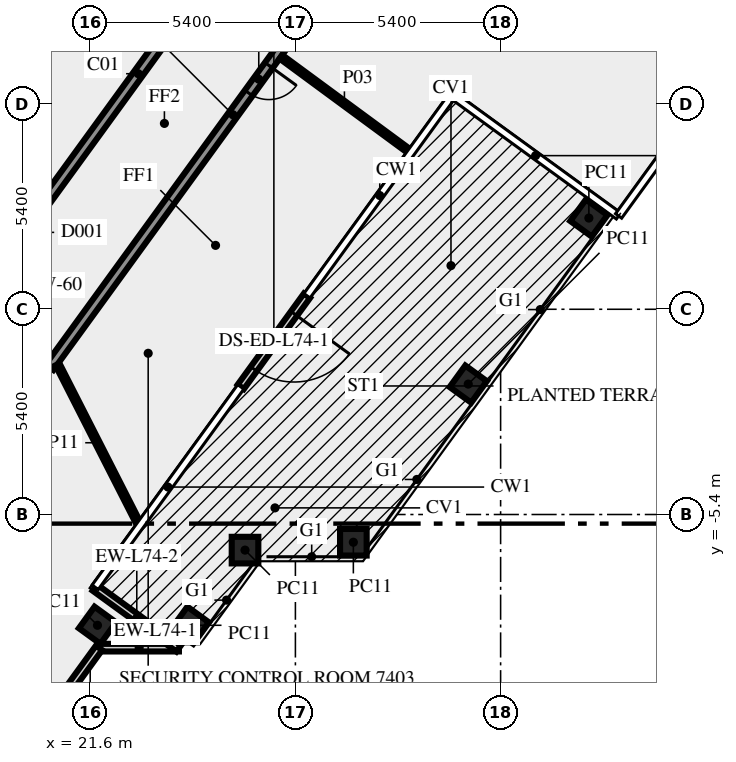
"""IFC4 building model, lengths in metres.
Left out: names, types, materials, properties, quantities, classifications, styles, units other than length and angle.
Written with IfcOpenShell. Run it as: python <this file> out.ifc"""

import sys

from ifc_helpers import new_model, si_unit, direction, frame, frame_2d, origin, origin_2d, place, context, subcontext, project, spatial, rectangle, extrude, element, fill, save


model = new_model("IFC4")
c1 = context("Model", 3, precision=1e-05, world=origin(), true_north=direction((0.0, 1.0)))
c2 = subcontext(c1, "Body", "Model", "MODEL_VIEW")
j1 = project(units=[si_unit("LENGTHUNIT", "METRE"), si_unit("PLANEANGLEUNIT", "RADIAN")], contexts=[c1])
p1 = place(None, origin())
s1 = spatial("IfcSite", under=j1, at=p1, CompositionType="ELEMENT")
p2 = place(p1, origin())
s2 = spatial("IfcBuilding", under=s1, at=p2, CompositionType="ELEMENT")
p3 = place(p2, frame((0.0, 0.0, 319.0)))
s3 = spatial("IfcBuildingStorey", under=s2, at=p3, CompositionType="ELEMENT", Elevation=319.0)
for number, where, z_axis, x_axis in (
    (1, (21.792, -8.315, 0.0), (0.0, 0.0, 1.0), (0.588, 0.809, 0.0)),
    (2, (24.235, -8.315, 0.0), (0.0, 0.0, 1.0), (0.588, 0.809, 0.0)),
    (3, (25.674, -6.337, 0.0), (0.0, 0.0, 1.0), (1.0, 0.0, 0.0)),
    (4, (28.525, -6.13, 0.0), (0.0, 0.0, 1.0), (1.0, 0.0, 0.0)),
    (5, (31.548, -1.969, 0.0), (0.0, 0.0, 1.0), (0.588, 0.809, 0.0)),
    (6, (34.722, 2.4, 0.0), (0.0, 0.0, 1.0), (0.588, 0.809, 0.0)),
):
    element("IfcColumn", number, at=place(p3, frame(where, z_axis=z_axis, x_axis=x_axis)), inside=s3, PredefinedType="COLUMN", context=c2, shape_type="SweptSolid", body=[
        extrude(rectangle(XDim=0.7, YDim=0.7, at=origin_2d()), origin(), (0.0, 0.0, 1.0), 3.65),
    ])
p4 = place(p3, frame((21.843, -8.904, 0.0), z_axis=(0.0, 0.0, 1.0), x_axis=(1.0, 0.0, 0.0)))
e7 = element("IfcWall", 7, at=p4, inside=s3, PredefinedType="SOLIDWALL", context=c2, shape_type="SweptSolid", body=[
    extrude(rectangle(XDim=2.092, YDim=0.2, at=frame_2d((1.046, 0.0))), origin(), (0.0, 0.0, 1.0), 3.65),
])
p5 = place(p3, frame((23.928, -8.925, 0.0), z_axis=(0.0, 0.0, 1.0), x_axis=(-0.809038277723, 0.587755957162, 0.0)))
e8 = element("IfcWall", 8, at=p5, inside=s3, PredefinedType="SOLIDWALL", context=c2, shape_type="SweptSolid", body=[
    extrude(rectangle(XDim=2.724, YDim=0.2, at=frame_2d((1.362, 0.0))), origin(), (0.0, 0.0, 1.0), 3.65),
])
p6 = place(p3, frame((27.304, 0.356, 0.0), z_axis=(0.0, 0.0, 1.0), x_axis=(-0.587774760134, -0.809024617271, 0.0)))
e9 = element("IfcWall", 9, at=p6, inside=s3, PredefinedType="SOLIDWALL", context=c2, shape_type="SweptSolid", body=[
    extrude(rectangle(XDim=2.963, YDim=0.2, at=frame_2d((1.481, 0.0))), origin(), (0.0, 0.0, 1.0), 3.65),
])
p7 = place(p6, frame((0.582, 0.0, 0.0)))
e10 = element("IfcOpeningElement", 10, at=p7, cuts=e9, PredefinedType="OPENING", context=c2, shape_type="SweptSolid", body=[
    extrude(rectangle(XDim=1.8, YDim=2.4, at=frame_2d((0.9, 1.2))), frame((0.0, 0.11, 0.0), z_axis=(0.0, -1.0, 0.0), x_axis=(1.0, 0.0, 0.0)), (0.0, 0.0, 1.0), 0.22),
])
p8 = place(p3, frame((20.253, -11.083, 0.0), z_axis=(0.0, 0.0, 1.0), x_axis=(0.587766567315, 0.809030569476, 0.0)))
e11 = element("IfcWall", 11, at=p8, inside=s3, PredefinedType="SOLIDWALL", context=c2, shape_type="SweptSolid", body=[
    extrude(rectangle(XDim=2.688, YDim=0.2, at=frame_2d((1.344, 0.0))), origin(), (0.0, 0.0, 1.0), 3.65),
])
p9 = place(p3, frame((17.545, -1.125, 0.0), z_axis=(0.0, 0.0, 1.0), x_axis=(0.58779555165, 0.809009511354, 0.0)))
e12 = element("IfcWall", 12, at=p9, inside=s3, PredefinedType="SOLIDWALL", context=c2, shape_type="SweptSolid", body=[
    extrude(rectangle(XDim=18.103, YDim=0.25, at=frame_2d((9.052, 0.0))), origin(), (0.0, 0.0, 1.0), 3.65),
])
p10 = place(p9, frame((3.441, 0.0, 0.0)))
e13 = element("IfcOpeningElement", 13, at=p10, cuts=e12, PredefinedType="OPENING", context=c2, shape_type="SweptSolid", body=[
    extrude(rectangle(XDim=0.9, YDim=2.1, at=frame_2d((0.45, 1.05))), frame((0.0, 0.135, 0.0), z_axis=(0.0, -1.0, 0.0), x_axis=(1.0, 0.0, 0.0)), (0.0, 0.0, 1.0), 0.27),
])
p11 = place(p3, frame((30.183, 11.761, 0.0), z_axis=(0.0, 0.0, 1.0), x_axis=(-0.587781762867, -0.80901952958, 0.0)))
e14 = element("IfcWall", 14, at=p11, inside=s3, PredefinedType="SOLIDWALL", context=c2, shape_type="SweptSolid", body=[
    extrude(rectangle(XDim=16.42, YDim=0.25, at=frame_2d((8.21, 0.0))), origin(), (0.0, 0.0, 1.0), 3.65),
])
p12 = place(p11, frame((0.225, 0.0, 0.0)))
e15 = element("IfcOpeningElement", 15, at=p12, cuts=e14, PredefinedType="OPENING", context=c2, shape_type="SweptSolid", body=[
    extrude(rectangle(XDim=0.9, YDim=2.1, at=frame_2d((0.45, 1.05))), frame((0.0, 0.135, 0.0), z_axis=(0.0, -1.0, 0.0), x_axis=(1.0, 0.0, 0.0)), (0.0, 0.0, 1.0), 0.27),
])
p13 = place(p11, frame((6.605, 0.0, 0.0)))
e16 = element("IfcOpeningElement", 16, at=p13, cuts=e14, PredefinedType="OPENING", context=c2, shape_type="SweptSolid", body=[
    extrude(rectangle(XDim=0.9, YDim=2.1, at=frame_2d((0.45, 1.05))), frame((0.0, 0.135, 0.0), z_axis=(0.0, -1.0, 0.0), x_axis=(1.0, 0.0, 0.0)), (0.0, 0.0, 1.0), 0.27),
])
p14 = place(p3, frame((37.458, 6.76, 0.0), z_axis=(0.0, 0.0, 1.0), x_axis=(-0.809016295501, 0.587786214209, 0.0)))
e17 = element("IfcWall", 17, at=p14, inside=s3, PredefinedType="PARTITIONING", context=c2, shape_type="SweptSolid", body=[
    extrude(rectangle(XDim=8.7, YDim=0.12, at=frame_2d((4.35, 0.0))), origin(), (0.0, 0.0, 1.0), 3.65),
])
p15 = place(p3, frame((26.619, 6.643, 0.0), z_axis=(0.0, 0.0, 1.0), x_axis=(0.805298264495, -0.592869888931, 0.0)))
e18 = element("IfcWall", 18, at=p15, inside=s3, PredefinedType="PARTITIONING", context=c2, shape_type="SweptSolid", body=[
    extrude(rectangle(XDim=4.15, YDim=0.12, at=frame_2d((2.075, 0.0))), origin(), (0.0, 0.0, 1.0), 3.65),
])
p16 = place(p3, frame((20.739, -1.45, 0.0), z_axis=(0.0, 0.0, 1.0), x_axis=(0.453931312426, -0.891036679155, 0.0)))
e19 = element("IfcWall", 19, at=p16, inside=s3, PredefinedType="PARTITIONING", context=c2, shape_type="SweptSolid", body=[
    extrude(rectangle(XDim=4.629, YDim=0.12, at=frame_2d((2.314, 0.0))), origin(), (0.0, 0.0, 1.0), 3.65),
])
p17 = place(p7, origin())
e20 = element("IfcDoor", 20, at=p17, inside=s3, OperationType="DOUBLE_DOOR_SINGLE_SWING", PredefinedType="DOOR", context=c2, shape_type="SweptSolid", body=[
    extrude(rectangle(XDim=1.8, YDim=2.4, at=frame_2d((0.9, 1.2))), frame((0.0, 0.025, 0.0), z_axis=(0.0, -1.0, 0.0), x_axis=(1.0, 0.0, 0.0)), (0.0, 0.0, 1.0), 0.05),
])
fill(e10, e20)
p18 = place(p13, origin())
e21 = element("IfcDoor", 21, at=p18, inside=s3, OperationType="SINGLE_SWING_LEFT", PredefinedType="DOOR", context=c2, shape_type="SweptSolid", body=[
    extrude(rectangle(XDim=0.9, YDim=2.1, at=frame_2d((0.45, 1.05))), frame((0.0, 0.025, 0.0), z_axis=(0.0, -1.0, 0.0), x_axis=(1.0, 0.0, 0.0)), (0.0, 0.0, 1.0), 0.05),
])
fill(e16, e21)
save(model, sys.argv[1])
